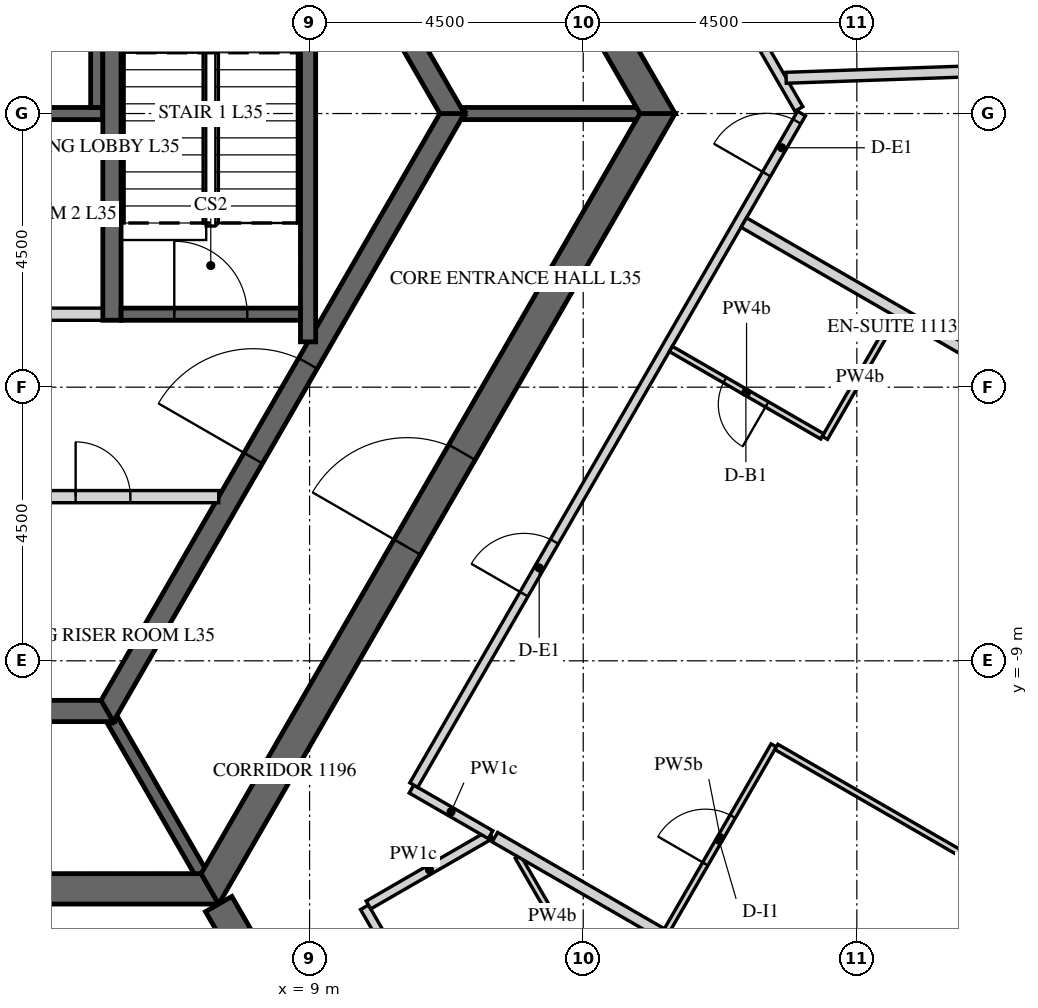
"""IFC4 building model, lengths in metres.
Left out: names, types, materials, properties, quantities, classifications, styles, units other than length and angle.
Written with IfcOpenShell. Run it as: python <this file> out.ifc"""

import sys

from ifc_helpers import new_model, si_unit, direction, frame, frame_2d, origin, place, context, subcontext, project, spatial, polyline, rectangle, outline, extrude, element, fill, save


model = new_model("IFC4")
c1 = context("Model", 3, precision=1e-05, world=origin(), true_north=direction((0.0, 1.0)))
c2 = subcontext(c1, "Body", "Model", "MODEL_VIEW")
j1 = project(units=[si_unit("LENGTHUNIT", "METRE"), si_unit("PLANEANGLEUNIT", "RADIAN")], contexts=[c1])
p1 = place(None, origin())
s1 = spatial("IfcSite", under=j1, at=p1, CompositionType="ELEMENT")
p2 = place(p1, origin())
s2 = spatial("IfcBuilding", under=s1, at=p2, CompositionType="ELEMENT")
p3 = place(p2, frame((0.0, 0.0, 152.7)))
s3 = spatial("IfcBuildingStorey", under=s2, at=p3, CompositionType="ELEMENT", Elevation=152.7)
p4 = place(p3, frame((17.63, -24.914, 0.0), z_axis=(0.0, 0.0, 1.0), x_axis=(0.499998569178, 0.866026229868, 0.0)))
e1 = element("IfcWall", 1, at=p4, inside=s3, PredefinedType="SOLIDWALL", context=c2, shape_type="SweptSolid", body=[
    extrude(outline(polyline([(-0.022, -0.275), (27.783, -0.275), (27.732, 0.275), (0.022, 0.275), (-0.022, -0.275)])), origin(), (0.0, 0.0, 1.0), 3.75),
])
p5 = place(p4, frame((1.879, 0.0, 0.9)))
e2 = element("IfcOpeningElement", 2, at=p5, cuts=e1, PredefinedType="OPENING", context=c2, shape_type="SweptSolid", body=[
    extrude(rectangle(XDim=2.4, YDim=2.4, at=frame_2d((1.2, 1.2))), frame((0.0, 0.285, 0.0), z_axis=(0.0, -1.0, 0.0), x_axis=(1.0, 0.0, 0.0)), (0.0, 0.0, 1.0), 0.57),
])
p6 = place(p4, frame((5.479, 0.0, 0.9)))
e3 = element("IfcOpeningElement", 3, at=p6, cuts=e1, PredefinedType="OPENING", context=c2, shape_type="SweptSolid", body=[
    extrude(rectangle(XDim=2.4, YDim=2.4, at=frame_2d((1.2, 1.2))), frame((0.0, 0.285, 0.0), z_axis=(0.0, -1.0, 0.0), x_axis=(1.0, 0.0, 0.0)), (0.0, 0.0, 1.0), 0.57),
])
p7 = place(p4, frame((9.079, 0.0, 0.9)))
e4 = element("IfcOpeningElement", 4, at=p7, cuts=e1, PredefinedType="OPENING", context=c2, shape_type="SweptSolid", body=[
    extrude(rectangle(XDim=2.4, YDim=2.4, at=frame_2d((1.2, 1.2))), frame((0.0, 0.285, 0.0), z_axis=(0.0, -1.0, 0.0), x_axis=(1.0, 0.0, 0.0)), (0.0, 0.0, 1.0), 0.57),
])
p8 = place(p4, frame((12.679, 0.0, 0.9)))
e5 = element("IfcOpeningElement", 5, at=p8, cuts=e1, PredefinedType="OPENING", context=c2, shape_type="SweptSolid", body=[
    extrude(rectangle(XDim=2.4, YDim=2.4, at=frame_2d((1.2, 1.2))), frame((0.0, 0.285, 0.0), z_axis=(0.0, -1.0, 0.0), x_axis=(1.0, 0.0, 0.0)), (0.0, 0.0, 1.0), 0.57),
])
p9 = place(p4, frame((16.279, 0.0, 0.9)))
e6 = element("IfcOpeningElement", 6, at=p9, cuts=e1, PredefinedType="OPENING", context=c2, shape_type="SweptSolid", body=[
    extrude(rectangle(XDim=2.4, YDim=2.4, at=frame_2d((1.2, 1.2))), frame((0.0, 0.285, 0.0), z_axis=(0.0, -1.0, 0.0), x_axis=(1.0, 0.0, 0.0)), (0.0, 0.0, 1.0), 0.57),
])
p10 = place(p4, frame((19.879, 0.0, 0.9)))
e7 = element("IfcOpeningElement", 7, at=p10, cuts=e1, PredefinedType="OPENING", context=c2, shape_type="SweptSolid", body=[
    extrude(rectangle(XDim=2.4, YDim=2.4, at=frame_2d((1.2, 1.2))), frame((0.0, 0.285, 0.0), z_axis=(0.0, -1.0, 0.0), x_axis=(1.0, 0.0, 0.0)), (0.0, 0.0, 1.0), 0.57),
])
p11 = place(p4, frame((23.479, 0.0, 0.9)))
e8 = element("IfcOpeningElement", 8, at=p11, cuts=e1, PredefinedType="OPENING", context=c2, shape_type="SweptSolid", body=[
    extrude(rectangle(XDim=2.4, YDim=2.4, at=frame_2d((1.2, 1.2))), frame((0.0, 0.285, 0.0), z_axis=(0.0, -1.0, 0.0), x_axis=(1.0, 0.0, 0.0)), (0.0, 0.0, 1.0), 0.57),
])
p12 = place(p3, frame((-7.361, -12.75, 0.0), z_axis=(0.0, 0.0, 1.0), x_axis=(1.0, 0.0, 0.0)))
e9 = element("IfcWall", 9, at=p12, inside=s3, PredefinedType="SHEAR", context=c2, shape_type="SweptSolid", body=[
    extrude(outline(polyline([(-0.144, -0.25), (14.866, -0.25), (14.578, 0.25), (0.144, 0.25), (-0.144, -0.25)])), origin(), (0.0, 0.0, 1.0), 3.75),
])
p13 = place(p12, frame((6.761, 0.0, 0.0)))
e10 = element("IfcOpeningElement", 10, at=p13, cuts=e9, PredefinedType="OPENING", context=c2, shape_type="SweptSolid", body=[
    extrude(rectangle(XDim=1.2, YDim=2.4, at=frame_2d((0.6, 1.2))), frame((0.0, 0.26, 0.0), z_axis=(0.0, -1.0, 0.0), x_axis=(1.0, 0.0, 0.0)), (0.0, 0.0, 1.0), 0.52),
])
p14 = place(p3, frame((7.361, -12.75, 0.0), z_axis=(0.0, 0.0, 1.0), x_axis=(0.50000571537, 0.866022103989, 0.0)))
e11 = element("IfcWall", 11, at=p14, inside=s3, PredefinedType="SHEAR", context=c2, shape_type="SweptSolid", body=[
    extrude(outline(polyline([(-0.144, -0.25), (14.867, -0.25), (14.578, 0.25), (0.144, 0.25), (-0.144, -0.25)])), origin(), (0.0, 0.0, 1.0), 3.75),
])
p15 = place(p14, frame((6.49, 0.0, 0.0)))
e12 = element("IfcOpeningElement", 12, at=p15, cuts=e11, PredefinedType="OPENING", context=c2, shape_type="SweptSolid", body=[
    extrude(rectangle(XDim=1.8, YDim=2.4, at=frame_2d((0.9, 1.2))), frame((0.0, 0.26, 0.0), z_axis=(0.0, -1.0, 0.0), x_axis=(1.0, 0.0, 0.0)), (0.0, 0.0, 1.0), 0.52),
])
p16 = place(p3, frame((14.722, 0.0, 0.0), z_axis=(0.0, 0.0, 1.0), x_axis=(-0.50000571537, 0.866022103989, 0.0)))
e13 = element("IfcWall", 13, at=p16, inside=s3, PredefinedType="SHEAR", context=c2, shape_type="SweptSolid", body=[
    extrude(outline(polyline([(-0.144, -0.25), (14.867, -0.25), (14.578, 0.25), (0.144, 0.25), (-0.144, -0.25)])), origin(), (0.0, 0.0, 1.0), 3.75),
])
p17 = place(p16, frame((6.432, 0.0, 0.0)))
e14 = element("IfcOpeningElement", 14, at=p17, cuts=e13, PredefinedType="OPENING", context=c2, shape_type="SweptSolid", body=[
    extrude(rectangle(XDim=1.8, YDim=2.4, at=frame_2d((0.9, 1.2))), frame((0.0, 0.26, 0.0), z_axis=(0.0, -1.0, 0.0), x_axis=(1.0, 0.0, 0.0)), (0.0, 0.0, 1.0), 0.52),
])
p18 = place(p3, frame((7.506, -13.0, 0.0), z_axis=(0.0, 0.0, 1.0), x_axis=(0.499988271576, -0.866032175087, 0.0)))
e15 = element("IfcWall", 15, at=p18, inside=s3, PredefinedType="SHEAR", context=c2, shape_type="SweptSolid", body=[
    extrude(rectangle(XDim=15.424, YDim=0.5, at=frame_2d((7.712, 0.0))), origin(), (0.0, 0.0, 1.0), 3.75),
])
p19 = place(p18, frame((6.812, 0.0, 0.0)))
e16 = element("IfcOpeningElement", 16, at=p19, cuts=e15, PredefinedType="OPENING", context=c2, shape_type="SweptSolid", body=[
    extrude(rectangle(XDim=1.8, YDim=2.4, at=frame_2d((0.9, 1.2))), frame((0.0, 0.26, 0.0), z_axis=(0.0, -1.0, 0.0), x_axis=(1.0, 0.0, 0.0)), (0.0, 0.0, 1.0), 0.52),
])
p20 = place(p3, frame((-5.673, -9.825, 0.0), z_axis=(0.0, 0.0, 1.0), x_axis=(1.0, 0.0, 0.0)))
e17 = element("IfcWall", 17, at=p20, inside=s3, PredefinedType="SHEAR", context=c2, shape_type="SweptSolid", body=[
    extrude(outline(polyline([(-0.101, -0.175), (11.446, -0.175), (11.244, 0.175), (0.101, 0.175), (-0.101, -0.175)])), origin(), (0.0, 0.0, 1.0), 3.75),
])
p21 = place(p3, frame((5.673, -9.825, 0.0), z_axis=(0.0, 0.0, 1.0), x_axis=(0.499995046907, 0.866028263435, 0.0)))
e18 = element("IfcWall", 18, at=p21, inside=s3, PredefinedType="SHEAR", context=c2, shape_type="SweptSolid", body=[
    extrude(outline(polyline([(-0.101, -0.175), (11.446, -0.175), (11.244, 0.175), (0.101, 0.175), (-0.101, -0.175)])), origin(), (0.0, 0.0, 1.0), 3.75),
])
p22 = place(p21, frame((4.801, 0.0, 0.0)))
e19 = element("IfcOpeningElement", 19, at=p22, cuts=e18, PredefinedType="OPENING", context=c2, shape_type="SweptSolid", body=[
    extrude(rectangle(XDim=1.8, YDim=2.4, at=frame_2d((0.9, 1.2))), frame((0.0, 0.185, 0.0), z_axis=(0.0, -1.0, 0.0), x_axis=(1.0, 0.0, 0.0)), (0.0, 0.0, 1.0), 0.37),
])
p23 = place(p3, frame((11.345, 0.0, 0.0), z_axis=(0.0, 0.0, 1.0), x_axis=(-0.499995046907, 0.866028263435, 0.0)))
e20 = element("IfcWall", 20, at=p23, inside=s3, PredefinedType="SHEAR", context=c2, shape_type="SweptSolid", body=[
    extrude(outline(polyline([(-0.101, -0.175), (11.446, -0.175), (11.244, 0.175), (0.101, 0.175), (-0.101, -0.175)])), origin(), (0.0, 0.0, 1.0), 3.75),
])
p24 = place(p23, frame((4.744, 0.0, 0.0)))
e21 = element("IfcOpeningElement", 21, at=p24, cuts=e20, PredefinedType="OPENING", context=c2, shape_type="SweptSolid", body=[
    extrude(rectangle(XDim=1.8, YDim=2.4, at=frame_2d((0.9, 1.2))), frame((0.0, 0.185, 0.0), z_axis=(0.0, -1.0, 0.0), x_axis=(1.0, 0.0, 0.0)), (0.0, 0.0, 1.0), 0.37),
])
p25 = place(p3, frame((-5.6, 0.0, -0.5), z_axis=(0.0, 0.0, 1.0), x_axis=(1.0, 0.0, 0.0)))
e22 = element("IfcWall", 22, at=p25, inside=s3, PredefinedType="SHEAR", context=c2, shape_type="SweptSolid", body=[
    extrude(rectangle(XDim=11.2, YDim=0.2, at=frame_2d((5.6, 0.0))), origin(), (0.0, 0.0, 1.0), 4.15),
])
p26 = place(p3, frame((5.5, 0.1, -0.5), z_axis=(0.0, 0.0, 1.0), x_axis=(0.0, 1.0, 0.0)))
e23 = element("IfcWall", 23, at=p26, inside=s3, PredefinedType="SHEAR", context=c2, shape_type="SweptSolid", body=[
    extrude(rectangle(XDim=3.1, YDim=0.2, at=frame_2d((1.55, 0.0))), origin(), (0.0, 0.0, 1.0), 4.15),
])
p27 = place(p3, frame((0.1, -3.3, 0.0), z_axis=(0.0, 0.0, 1.0), x_axis=(1.0, 0.0, 0.0)))
e24 = element("IfcWall", 24, at=p27, inside=s3, PredefinedType="PARTITIONING", context=c2, shape_type="SweptSolid", body=[
    extrude(rectangle(XDim=5.5, YDim=0.2, at=frame_2d((2.75, 0.0))), origin(), (0.0, 0.0, 1.0), 3.65),
])
p28 = place(p27, frame((2.3, 0.0, 0.0)))
e25 = element("IfcOpeningElement", 25, at=p28, cuts=e24, PredefinedType="OPENING", context=c2, shape_type="SweptSolid", body=[
    extrude(rectangle(XDim=0.9, YDim=2.1, at=frame_2d((0.45, 1.05))), frame((0.0, 0.11, 0.0), z_axis=(0.0, -1.0, 0.0), x_axis=(1.0, 0.0, 0.0)), (0.0, 0.0, 1.0), 0.22),
])
p29 = place(p3, frame((3.7, -6.3, 0.0), z_axis=(0.0, 0.0, 1.0), x_axis=(1.0, 0.0, 0.0)))
e26 = element("IfcWall", 26, at=p29, inside=s3, PredefinedType="PARTITIONING", context=c2, shape_type="SweptSolid", body=[
    extrude(rectangle(XDim=3.806, YDim=0.2, at=frame_2d((1.903, 0.0))), origin(), (0.0, 0.0, 1.0), 3.65),
])
p30 = place(p29, frame((1.453, 0.0, 0.0)))
e27 = element("IfcOpeningElement", 27, at=p30, cuts=e26, PredefinedType="OPENING", context=c2, shape_type="SweptSolid", body=[
    extrude(rectangle(XDim=0.9, YDim=2.1, at=frame_2d((0.45, 1.05))), frame((0.0, 0.11, 0.0), z_axis=(0.0, -1.0, 0.0), x_axis=(1.0, 0.0, 0.0)), (0.0, 0.0, 1.0), 0.22),
])
for number, where, z_axis, x_axis in (
    (28, (11.547, 0.0, 0.0), (0.0, 0.0, 1.0), (1.0, 0.0, 0.0)),
    (29, (5.773, -10.0, 0.0), (0.0, 0.0, 1.0), (0.5, -0.866, 0.0)),
):
    element("IfcWall", number, at=place(p3, frame(where, z_axis=z_axis, x_axis=x_axis)), inside=s3, PredefinedType="SHEAR", context=c2, shape_type="SweptSolid", body=[
        extrude(rectangle(XDim=2.887, YDim=0.2, at=frame_2d((1.443, 0.0))), origin(), (0.0, 0.0, 1.0), 3.75),
    ])
p31 = place(p3, frame((5.75, -3.4, -0.5), z_axis=(0.0, 0.0, 1.0), x_axis=(0.0, 1.0, 0.0)))
e30 = element("IfcWall", 30, at=p31, inside=s3, PredefinedType="SHEAR", context=c2, shape_type="SweptSolid", body=[
    extrude(rectangle(XDim=6.8, YDim=0.3, at=frame_2d((3.4, 0.0))), origin(), (0.0, 0.0, 1.0), 4.15),
])
p32 = place(p3, frame((8.975, -3.755, -0.5), z_axis=(0.0, 0.0, 1.0), x_axis=(0.0, 1.0, 0.0)))
e31 = element("IfcWall", 31, at=p32, inside=s3, PredefinedType="SHEAR", context=c2, shape_type="SweptSolid", body=[
    extrude(rectangle(XDim=7.51, YDim=0.25, at=frame_2d((3.755, 0.0))), origin(), (0.0, 0.0, 1.0), 4.15),
])
p33 = place(p3, frame((5.9, -3.3, -0.5), z_axis=(0.0, 0.0, 1.0), x_axis=(1.0, 0.0, 0.0)))
e32 = element("IfcWall", 32, at=p33, inside=s3, PredefinedType="SHEAR", context=c2, shape_type="SweptSolid", body=[
    extrude(rectangle(XDim=2.95, YDim=0.2, at=frame_2d((1.475, 0.0))), origin(), (0.0, 0.0, 1.0), 4.15),
])
p34 = place(p33, frame((0.875, 0.0, 0.5)))
e33 = element("IfcOpeningElement", 33, at=p34, cuts=e32, PredefinedType="OPENING", context=c2, shape_type="SweptSolid", body=[
    extrude(rectangle(XDim=1.2, YDim=2.4, at=frame_2d((0.6, 1.2))), frame((0.0, 0.11, 0.0), z_axis=(0.0, -1.0, 0.0), x_axis=(1.0, 0.0, 0.0)), (0.0, 0.0, 1.0), 0.22),
])
p35 = place(p3, frame((13.699, -19.628, 0.0), z_axis=(0.0, 0.0, 1.0), x_axis=(-0.499998968938, 0.866025999068, 0.0)))
e34 = element("IfcWall", 34, at=p35, inside=s3, PredefinedType="PARTITIONING", context=c2, shape_type="SweptSolid", body=[
    extrude(rectangle(XDim=7.592, YDim=0.15, at=frame_2d((3.796, 0.0))), origin(), (0.0, 0.0, 1.0), 2.823),
])
p36 = place(p35, frame((2.033, 0.0, 0.0)))
e35 = element("IfcOpeningElement", 35, at=p36, cuts=e34, PredefinedType="OPENING", context=c2, shape_type="SweptSolid", body=[
    extrude(rectangle(XDim=1.0, YDim=2.1, at=frame_2d((0.5, 1.05))), frame((0.0, 0.085, 0.0), z_axis=(0.0, -1.0, 0.0), x_axis=(1.0, 0.0, 0.0)), (0.0, 0.0, 1.0), 0.17),
])
p37 = place(p3, frame((9.968, -13.016, 0.0), z_axis=(0.0, 0.0, 1.0), x_axis=(0.866022320763, 0.500005339912, 0.0)))
e36 = element("IfcWall", 36, at=p37, inside=s3, PredefinedType="PARTITIONING", context=c2, shape_type="SweptSolid", body=[
    extrude(rectangle(XDim=2.316, YDim=0.15, at=frame_2d((1.158, 0.0))), origin(), (0.0, 0.0, 1.0), 2.823),
])
p38 = place(p3, frame((11.977, -11.859, 0.0), z_axis=(0.0, 0.0, 1.0), x_axis=(-0.865993364801, 0.500055489042, 0.0)))
e37 = element("IfcWall", 37, at=p38, inside=s3, PredefinedType="PARTITIONING", context=c2, shape_type="SweptSolid", body=[
    extrude(rectangle(XDim=1.502, YDim=0.15, at=frame_2d((0.751, 0.0))), origin(), (0.0, 0.0, 1.0), 2.823),
])
p39 = place(p3, frame((10.714, -11.043, 0.0), z_axis=(0.0, 0.0, 1.0), x_axis=(0.500001980452, 0.866024260367, 0.0)))
e38 = element("IfcWall", 38, at=p39, inside=s3, PredefinedType="PARTITIONING", context=c2, shape_type="SweptSolid", body=[
    extrude(rectangle(XDim=12.752, YDim=0.15, at=frame_2d((6.376, 0.0))), origin(), (0.0, 0.0, 1.0), 2.823),
])
p40 = place(p39, frame((3.625, 0.0, 0.0)))
e39 = element("IfcOpeningElement", 39, at=p40, cuts=e38, PredefinedType="OPENING", context=c2, shape_type="SweptSolid", body=[
    extrude(rectangle(XDim=1.0, YDim=2.1, at=frame_2d((0.5, 1.05))), frame((0.0, 0.085, 0.0), z_axis=(0.0, -1.0, 0.0), x_axis=(1.0, 0.0, 0.0)), (0.0, 0.0, 1.0), 0.17),
])
p41 = place(p39, frame((11.602, 0.0, 0.0)))
e40 = element("IfcOpeningElement", 40, at=p41, cuts=e38, PredefinedType="OPENING", context=c2, shape_type="SweptSolid", body=[
    extrude(rectangle(XDim=1.0, YDim=2.1, at=frame_2d((0.5, 1.05))), frame((0.0, 0.085, 0.0), z_axis=(0.0, -1.0, 0.0), x_axis=(1.0, 0.0, 0.0)), (0.0, 0.0, 1.0), 0.17),
])
p42 = place(p3, frame((17.046, 0.075, 0.0), z_axis=(0.0, 0.0, 1.0), x_axis=(-0.499999403554, 0.866025748143, 0.0)))
e41 = element("IfcWall", 41, at=p42, inside=s3, PredefinedType="PARTITIONING", context=c2, shape_type="SweptSolid", body=[
    extrude(rectangle(XDim=14.549, YDim=0.15, at=frame_2d((7.275, 0.0))), origin(), (0.0, 0.0, 1.0), 2.823),
])
p43 = place(p42, frame((1.781, 0.0, 0.0)))
e42 = element("IfcOpeningElement", 42, at=p43, cuts=e41, PredefinedType="OPENING", context=c2, shape_type="SweptSolid", body=[
    extrude(rectangle(XDim=1.0, YDim=2.1, at=frame_2d((0.5, 1.05))), frame((0.0, 0.085, 0.0), z_axis=(0.0, -1.0, 0.0), x_axis=(1.0, 0.0, 0.0)), (0.0, 0.0, 1.0), 0.17),
])
p44 = place(p42, frame((8.705, 0.0, 0.0)))
e43 = element("IfcOpeningElement", 43, at=p44, cuts=e41, PredefinedType="OPENING", context=c2, shape_type="SweptSolid", body=[
    extrude(rectangle(XDim=1.0, YDim=2.1, at=frame_2d((0.5, 1.05))), frame((0.0, 0.085, 0.0), z_axis=(0.0, -1.0, 0.0), x_axis=(1.0, 0.0, 0.0)), (0.0, 0.0, 1.0), 0.17),
])
p45 = place(p3, frame((12.426, -12.223, 0.0), z_axis=(0.0, 0.0, 1.0), x_axis=(0.499919032186, -0.866072145528, 0.0)))
e44 = element("IfcWall", 44, at=p45, inside=s3, PredefinedType="PARTITIONING", context=c2, shape_type="SweptSolid", body=[
    extrude(rectangle(XDim=2.258, YDim=0.1, at=frame_2d((1.129, 0.0))), origin(), (0.0, 0.0, 1.0), 2.823),
])
p46 = place(p3, frame((21.631, -17.433, 0.0), z_axis=(0.0, 0.0, 1.0), x_axis=(-0.866031296205, 0.499989793889, 0.0)))
e45 = element("IfcWall", 45, at=p46, inside=s3, PredefinedType="PARTITIONING", context=c2, shape_type="SweptSolid", body=[
    extrude(rectangle(XDim=11.067, YDim=0.18, at=frame_2d((5.534, 0.0))), origin(), (0.0, 0.0, 1.0), 2.823),
])
p47 = place(p3, frame((18.629, -3.333, 0.0), z_axis=(0.0, 0.0, 1.0), x_axis=(-0.500015210774, -0.866016621662, 0.0)))
e46 = element("IfcWall", 46, at=p47, inside=s3, PredefinedType="PARTITIONING", context=c2, shape_type="SweptSolid", body=[
    extrude(rectangle(XDim=2.31, YDim=0.1, at=frame_2d((1.155, 0.0))), origin(), (0.0, 0.0, 1.0), 2.823),
])
p48 = place(p3, frame((17.431, -5.309, 0.0), z_axis=(0.0, 0.0, 1.0), x_axis=(-0.866018712932, 0.500011588718, 0.0)))
e47 = element("IfcWall", 47, at=p48, inside=s3, PredefinedType="PARTITIONING", context=c2, shape_type="SweptSolid", body=[
    extrude(rectangle(XDim=2.875, YDim=0.1, at=frame_2d((1.438, 0.0))), origin(), (0.0, 0.0, 1.0), 2.823),
])
p49 = place(p48, frame((1.05, 0.0, 0.0)))
e48 = element("IfcOpeningElement", 48, at=p49, cuts=e47, PredefinedType="OPENING", context=c2, shape_type="SweptSolid", body=[
    extrude(rectangle(XDim=0.8, YDim=2.1, at=frame_2d((0.4, 1.05))), frame((0.0, 0.06, 0.0), z_axis=(0.0, -1.0, 0.0), x_axis=(1.0, 0.0, 0.0)), (0.0, 0.0, 1.0), 0.12),
])
p50 = place(p3, frame((14.878, -13.43, 0.0), z_axis=(0.0, 0.0, 1.0), x_axis=(0.500021481416, 0.866013001128, 0.0)))
e49 = element("IfcWall", 49, at=p50, inside=s3, PredefinedType="PARTITIONING", context=c2, shape_type="SweptSolid", body=[
    extrude(rectangle(XDim=3.51, YDim=0.1, at=frame_2d((1.755, 0.0))), origin(), (0.0, 0.0, 1.0), 2.823),
])
p51 = place(p50, frame((1.26, 0.0, 0.0)))
e50 = element("IfcOpeningElement", 50, at=p51, cuts=e49, PredefinedType="OPENING", context=c2, shape_type="SweptSolid", body=[
    extrude(rectangle(XDim=0.9, YDim=2.1, at=frame_2d((0.45, 1.05))), frame((0.0, 0.06, 0.0), z_axis=(0.0, -1.0, 0.0), x_axis=(1.0, 0.0, 0.0)), (0.0, 0.0, 1.0), 0.12),
])
p52 = place(p3, frame((16.676, -10.416, 0.0), z_axis=(0.0, 0.0, 1.0), x_axis=(0.866034953203, -0.499983459557, 0.0)))
e51 = element("IfcWall", 51, at=p52, inside=s3, PredefinedType="PARTITIONING", context=c2, shape_type="SweptSolid", body=[
    extrude(rectangle(XDim=7.8, YDim=0.1, at=frame_2d((3.9, 0.0))), origin(), (0.0, 0.0, 1.0), 2.823),
])
p53 = place(p3, frame((27.031, -8.08, 0.0), z_axis=(0.0, 0.0, 1.0), x_axis=(-0.86602780907, 0.499995833901, 0.0)))
e52 = element("IfcWall", 52, at=p53, inside=s3, PredefinedType="PARTITIONING", context=c2, shape_type="SweptSolid", body=[
    extrude(rectangle(XDim=12.575, YDim=0.18, at=frame_2d((6.287, 0.0))), origin(), (0.0, 0.0, 1.0), 2.823),
])
p54 = place(p3, frame((31.667, 1.106, 0.0), z_axis=(0.0, 0.0, 1.0), x_axis=(-0.999390937365, -0.034896336667, 0.0)))
e53 = element("IfcWall", 53, at=p54, inside=s3, PredefinedType="PARTITIONING", context=c2, shape_type="SweptSolid", body=[
    extrude(rectangle(XDim=14.839, YDim=0.18, at=frame_2d((7.419, 0.0))), origin(), (0.0, 0.0, 1.0), 2.823),
])
p55 = place(p15, origin())
e54 = element("IfcDoor", 54, at=p55, inside=s3, OperationType="DOUBLE_DOOR_SINGLE_SWING", PredefinedType="DOOR", context=c2, shape_type="SweptSolid", body=[
    extrude(rectangle(XDim=1.8, YDim=2.4, at=frame_2d((0.9, 1.2))), frame((0.0, 0.025, 0.0), z_axis=(0.0, -1.0, 0.0), x_axis=(1.0, 0.0, 0.0)), (0.0, 0.0, 1.0), 0.05),
])
fill(e12, e54)
p56 = place(p22, origin())
e55 = element("IfcDoor", 55, at=p56, inside=s3, OperationType="DOUBLE_DOOR_SINGLE_SWING", PredefinedType="DOOR", context=c2, shape_type="SweptSolid", body=[
    extrude(rectangle(XDim=1.8, YDim=2.4, at=frame_2d((0.9, 1.2))), frame((0.0, 0.025, 0.0), z_axis=(0.0, -1.0, 0.0), x_axis=(1.0, 0.0, 0.0)), (0.0, 0.0, 1.0), 0.05),
])
fill(e19, e55)
p57 = place(p30, origin())
e56 = element("IfcDoor", 56, at=p57, inside=s3, OperationType="SINGLE_SWING_LEFT", PredefinedType="DOOR", context=c2, shape_type="SweptSolid", body=[
    extrude(rectangle(XDim=0.9, YDim=2.1, at=frame_2d((0.45, 1.05))), frame((0.0, 0.025, 0.0), z_axis=(0.0, -1.0, 0.0), x_axis=(1.0, 0.0, 0.0)), (0.0, 0.0, 1.0), 0.05),
])
fill(e27, e56)
p58 = place(p34, origin())
e57 = element("IfcDoor", 57, at=p58, inside=s3, OperationType="SINGLE_SWING_LEFT", PredefinedType="DOOR", context=c2, shape_type="SweptSolid", body=[
    extrude(rectangle(XDim=1.2, YDim=2.4, at=frame_2d((0.6, 1.2))), frame((0.0, 0.025, 0.0), z_axis=(0.0, -1.0, 0.0), x_axis=(1.0, 0.0, 0.0)), (0.0, 0.0, 1.0), 0.05),
])
fill(e33, e57)
p59 = place(p40, origin())
e58 = element("IfcDoor", 58, at=p59, inside=s3, OperationType="SINGLE_SWING_RIGHT", PredefinedType="DOOR", context=c2, shape_type="SweptSolid", body=[
    extrude(rectangle(XDim=1.0, YDim=2.1, at=frame_2d((0.5, 1.05))), frame((0.0, 0.025, 0.0), z_axis=(0.0, -1.0, 0.0), x_axis=(1.0, 0.0, 0.0)), (0.0, 0.0, 1.0), 0.05),
])
fill(e39, e58)
p60 = place(p49, origin())
e59 = element("IfcDoor", 59, at=p60, inside=s3, OperationType="SINGLE_SWING_LEFT", PredefinedType="DOOR", context=c2, shape_type="SweptSolid", body=[
    extrude(rectangle(XDim=0.8, YDim=2.1, at=frame_2d((0.4, 1.05))), frame((0.0, 0.025, 0.0), z_axis=(0.0, -1.0, 0.0), x_axis=(1.0, 0.0, 0.0)), (0.0, 0.0, 1.0), 0.05),
])
fill(e48, e59)
p61 = place(p51, origin())
e60 = element("IfcDoor", 60, at=p61, inside=s3, OperationType="SINGLE_SWING_RIGHT", PredefinedType="DOOR", context=c2, shape_type="SweptSolid", body=[
    extrude(rectangle(XDim=0.9, YDim=2.1, at=frame_2d((0.45, 1.05))), frame((0.0, 0.025, 0.0), z_axis=(0.0, -1.0, 0.0), x_axis=(1.0, 0.0, 0.0)), (0.0, 0.0, 1.0), 0.05),
])
fill(e50, e60)
p62 = place(p41, origin())
e61 = element("IfcDoor", 61, at=p62, inside=s3, OperationType="SINGLE_SWING_LEFT", PredefinedType="DOOR", context=c2, shape_type="SweptSolid", body=[
    extrude(rectangle(XDim=1.0, YDim=2.1, at=frame_2d((0.5, 1.05))), frame((0.0, 0.025, 0.0), z_axis=(0.0, -1.0, 0.0), x_axis=(1.0, 0.0, 0.0)), (0.0, 0.0, 1.0), 0.05),
])
fill(e40, e61)
save(model, sys.argv[1])
